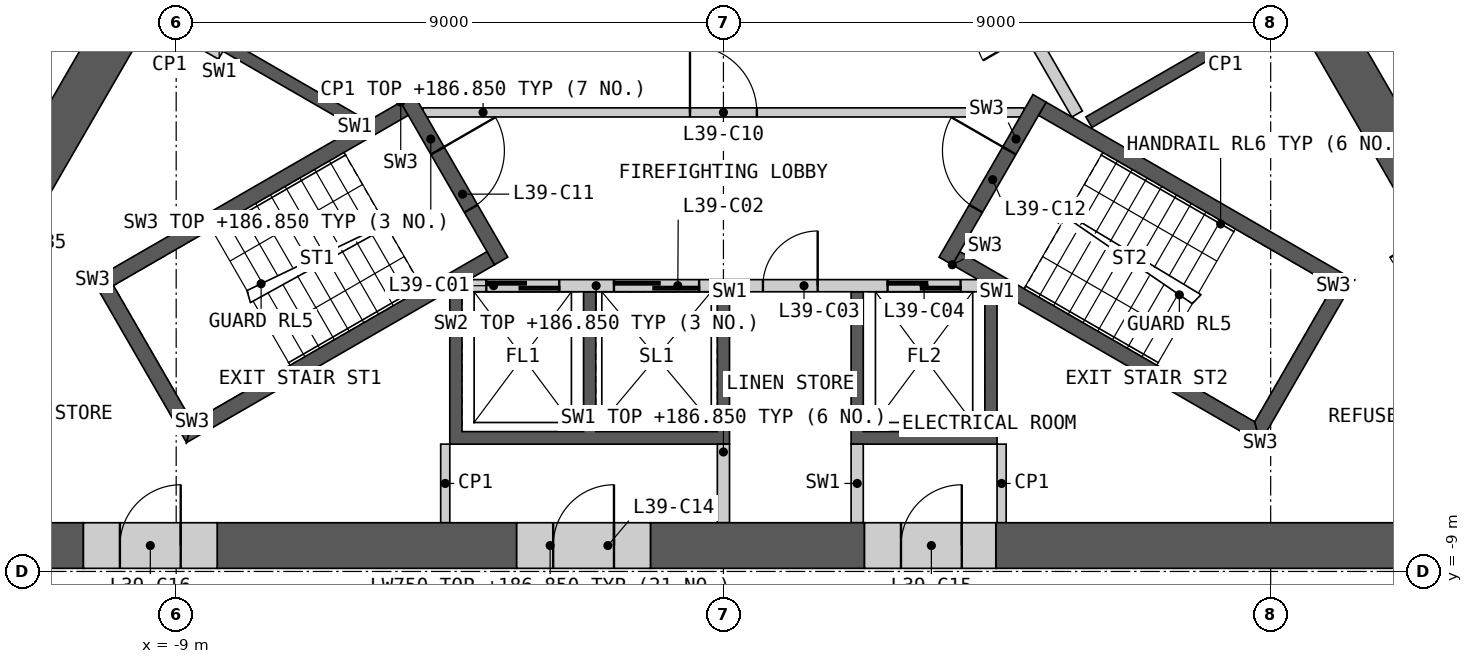
"""IFC4 building model, lengths in metres.
Left out: names, types, materials, properties, quantities, classifications, styles, units other than length and angle.
Written with IfcOpenShell. Run it as: python <this file> out.ifc"""

import sys

from ifc_helpers import new_model, si_unit, direction, frame, frame_2d, origin, place, context, subcontext, project, spatial, polyline, rectangle, outline, extrude, element, fill, save


model = new_model("IFC4")
c1 = context("Model", 3, precision=1e-05, world=origin(), true_north=direction((0.0, 1.0)))
c2 = subcontext(c1, "Body", "Model", "MODEL_VIEW")
j1 = project(units=[si_unit("LENGTHUNIT", "METRE"), si_unit("PLANEANGLEUNIT", "RADIAN")], contexts=[c1])
p1 = place(None, origin())
s1 = spatial("IfcSite", under=j1, at=p1, CompositionType="ELEMENT")
p2 = place(p1, origin())
s2 = spatial("IfcBuilding", under=s1, at=p2, CompositionType="ELEMENT")
p3 = place(p2, frame((0.0, 0.0, 183.6)))
s3 = spatial("IfcBuildingStorey", under=s2, at=p3, CompositionType="ELEMENT", Elevation=183.6)
p4 = place(p3, origin())
e1 = element("IfcWall", 1, at=p4, inside=s3, PredefinedType="SHEAR", context=c2, shape_type="SweptSolid", body=[
    extrude(outline(polyline([(4.5, -4.4), (4.5, -6.906), (2.1, -6.906), (2.1, -4.4), (2.3, -4.4), (2.3, -6.7), (4.3, -6.7), (4.3, -4.4), (4.5, -4.4)])), origin(), (0.0, 0.0, 1.0), 3.25),
])
p5 = place(p3, origin())
e2 = element("IfcWall", 2, at=p5, inside=s3, PredefinedType="SHEAR", context=c2, shape_type="SweptSolid", body=[
    extrude(outline(polyline([(0.1, -4.4), (0.1, -6.906), (-4.5, -6.906), (-4.5, -4.4), (-4.3, -4.4), (-4.3, -6.7), (-2.3, -6.7), (-2.3, -4.4), (-2.1, -4.4), (-2.1, -6.7), (-0.1, -6.7), (-0.1, -4.4), (0.1, -4.4)])), origin(), (0.0, 0.0, 1.0), 3.25),
])
p6 = place(p3, frame((-4.187, -4.3, 0.0), z_axis=(0.0, 0.0, 1.0), x_axis=(1.0, 0.0, 0.0)))
e3 = element("IfcWall", 3, at=p6, inside=s3, PredefinedType="SOLIDWALL", context=c2, shape_type="SweptSolid", body=[
    extrude(rectangle(XDim=8.373, YDim=0.2, at=frame_2d((4.187, 0.0))), origin(), (0.0, 0.0, 1.0), 3.25),
])
p7 = place(p6, frame((0.287, 0.0, 0.0)))
e4 = element("IfcOpeningElement", 4, at=p7, cuts=e3, PredefinedType="OPENING", context=c2, shape_type="SweptSolid", body=[
    extrude(rectangle(XDim=1.2, YDim=2.1, at=frame_2d((0.6, 1.05))), frame((0.0, 0.11, 0.0), z_axis=(0.0, -1.0, 0.0), x_axis=(1.0, 0.0, 0.0)), (0.0, 0.0, 1.0), 0.22),
])
p8 = place(p6, frame((2.387, 0.0, 0.0)))
e5 = element("IfcOpeningElement", 5, at=p8, cuts=e3, PredefinedType="OPENING", context=c2, shape_type="SweptSolid", body=[
    extrude(rectangle(XDim=1.4, YDim=2.1, at=frame_2d((0.7, 1.05))), frame((0.0, 0.11, 0.0), z_axis=(0.0, -1.0, 0.0), x_axis=(1.0, 0.0, 0.0)), (0.0, 0.0, 1.0), 0.22),
])
p9 = place(p6, frame((4.837, 0.0, 0.0)))
e6 = element("IfcOpeningElement", 6, at=p9, cuts=e3, PredefinedType="OPENING", context=c2, shape_type="SweptSolid", body=[
    extrude(rectangle(XDim=0.9, YDim=2.1, at=frame_2d((0.45, 1.05))), frame((0.0, 0.11, 0.0), z_axis=(0.0, -1.0, 0.0), x_axis=(1.0, 0.0, 0.0)), (0.0, 0.0, 1.0), 0.22),
])
p10 = place(p6, frame((6.887, 0.0, 0.0)))
e7 = element("IfcOpeningElement", 7, at=p10, cuts=e3, PredefinedType="OPENING", context=c2, shape_type="SweptSolid", body=[
    extrude(rectangle(XDim=1.2, YDim=2.1, at=frame_2d((0.6, 1.05))), frame((0.0, 0.11, 0.0), z_axis=(0.0, -1.0, 0.0), x_axis=(1.0, 0.0, 0.0)), (0.0, 0.0, 1.0), 0.22),
])
for number, where, z_axis, x_axis in (
    (8, (0.0, -6.906, 0.0), (0.0, 0.0, 1.0), (0.0, -1.0, 0.0)),
    (9, (2.2, -6.906, 0.0), (0.0, 0.0, 1.0), (0.0, -1.0, 0.0)),
):
    element("IfcWall", number, at=place(p3, frame(where, z_axis=z_axis, x_axis=x_axis)), inside=s3, PredefinedType="SHEAR", context=c2, shape_type="SweptSolid", body=[
        extrude(rectangle(XDim=1.293, YDim=0.2, at=frame_2d((0.646, 0.0))), origin(), (0.0, 0.0, 1.0), 3.25),
    ])
p11 = place(p3, origin())
e10 = element("IfcWall", 10, at=p11, inside=s3, PredefinedType="SHEAR", context=c2, shape_type="SweptSolid", body=[
    extrude(outline(polyline([(3.76, 2.287), (5.931, 3.54), (8.231, -0.444), (6.061, -1.697), (5.96, -1.524), (7.952, -0.374), (5.852, 3.263), (3.861, 2.113), (3.76, 2.287)])), origin(), (0.0, 0.0, 1.0), 3.25),
])
p12 = place(p3, frame((5.817, -1.476, 0.0), z_axis=(0.0, 0.0, 1.0), x_axis=(-0.500002616675, 0.866023893041, 0.0)))
e11 = element("IfcWall", 11, at=p12, inside=s3, PredefinedType="SOLIDWALL", context=c2, shape_type="SweptSolid", body=[
    extrude(rectangle(XDim=8.373, YDim=0.2, at=frame_2d((4.187, 0.0))), origin(), (0.0, 0.0, 1.0), 3.25),
])
p13 = place(p12, frame((1.537, 0.0, 0.0)))
e12 = element("IfcOpeningElement", 12, at=p13, cuts=e11, PredefinedType="OPENING", context=c2, shape_type="SweptSolid", body=[
    extrude(rectangle(XDim=0.9, YDim=2.1, at=frame_2d((0.45, 1.05))), frame((0.0, 0.11, 0.0), z_axis=(0.0, -1.0, 0.0), x_axis=(1.0, 0.0, 0.0)), (0.0, 0.0, 1.0), 0.22),
])
p14 = place(p12, frame((4.837, 0.0, 0.0)))
e13 = element("IfcOpeningElement", 13, at=p14, cuts=e11, PredefinedType="OPENING", context=c2, shape_type="SweptSolid", body=[
    extrude(rectangle(XDim=0.9, YDim=2.1, at=frame_2d((0.45, 1.05))), frame((0.0, 0.11, 0.0), z_axis=(0.0, -1.0, 0.0), x_axis=(1.0, 0.0, 0.0)), (0.0, 0.0, 1.0), 0.22),
])
p15 = place(p12, frame((6.937, 0.0, 0.0)))
e14 = element("IfcOpeningElement", 14, at=p15, cuts=e11, PredefinedType="OPENING", context=c2, shape_type="SweptSolid", body=[
    extrude(rectangle(XDim=1.1, YDim=2.1, at=frame_2d((0.55, 1.05))), frame((0.0, 0.11, 0.0), z_axis=(0.0, -1.0, 0.0), x_axis=(1.0, 0.0, 0.0)), (0.0, 0.0, 1.0), 0.22),
])
p16 = place(p3, origin())
e15 = element("IfcWall", 15, at=p16, inside=s3, PredefinedType="SHEAR", context=c2, shape_type="SweptSolid", body=[
    extrude(outline(polyline([(-6.061, -1.697), (-8.231, -0.444), (-8.131, -0.271), (-5.96, -1.524), (-6.061, -1.697)])), origin(), (0.0, 0.0, 1.0), 3.25),
])
p17 = place(p3, frame((-4.941, -1.45, 0.0), z_axis=(0.0, 0.0, 1.0), x_axis=(1.0, 0.0, 0.0)))
e16 = element("IfcWall", 16, at=p17, inside=s3, PredefinedType="PARTITIONING", context=c2, shape_type="SweptSolid", body=[
    extrude(rectangle(XDim=9.882, YDim=0.15, at=frame_2d((4.941, 0.0))), origin(), (0.0, 0.0, 1.0), 3.25),
])
p18 = place(p17, frame((4.391, 0.0, 0.0)))
e17 = element("IfcOpeningElement", 17, at=p18, cuts=e16, PredefinedType="OPENING", context=c2, shape_type="SweptSolid", body=[
    extrude(rectangle(XDim=1.1, YDim=2.1, at=frame_2d((0.55, 1.05))), frame((0.0, 0.085, 0.0), z_axis=(0.0, -1.0, 0.0), x_axis=(1.0, 0.0, 0.0)), (0.0, 0.0, 1.0), 0.17),
])
p19 = place(p3, origin())
e18 = element("IfcWall", 18, at=p19, inside=s3, PredefinedType="SHEAR", context=c2, shape_type="SweptSolid", body=[
    extrude(outline(polyline([(-5.307, -1.281), (-10.374, -4.206), (-10.032, -4.298), (-5.182, -1.498), (-5.307, -1.281)])), origin(), (0.0, 0.0, 1.0), 3.25),
])
p20 = place(p3, origin())
e19 = element("IfcWall", 19, at=p20, inside=s3, PredefinedType="SHEAR", context=c2, shape_type="SweptSolid", body=[
    extrude(outline(polyline([(-10.374, -4.206), (-8.83, -6.881), (-8.738, -6.539), (-10.032, -4.298), (-10.374, -4.206)])), origin(), (0.0, 0.0, 1.0), 3.25),
])
p21 = place(p3, origin())
e20 = element("IfcWall", 20, at=p21, inside=s3, PredefinedType="SHEAR", context=c2, shape_type="SweptSolid", body=[
    extrude(outline(polyline([(-8.738, -6.539), (-8.83, -6.881), (-3.763, -3.956), (-3.888, -3.739), (-8.738, -6.539)])), origin(), (0.0, 0.0, 1.0), 3.25),
])
p22 = place(p3, frame((-5.199, -1.219, 0.0), z_axis=(0.0, 0.0, 1.0), x_axis=(0.499982516597, -0.866035497597, 0.0)))
e21 = element("IfcWall", 21, at=p22, inside=s3, PredefinedType="SHEAR", context=c2, shape_type="SweptSolid", body=[
    extrude(rectangle(XDim=3.088, YDim=0.25, at=frame_2d((1.544, 0.0))), origin(), (0.0, 0.0, 1.0), 3.25),
])
p23 = place(p22, frame((0.994, 0.0, 0.0)))
e22 = element("IfcOpeningElement", 22, at=p23, cuts=e21, PredefinedType="OPENING", context=c2, shape_type="SweptSolid", body=[
    extrude(rectangle(XDim=1.1, YDim=2.1, at=frame_2d((0.55, 1.05))), frame((0.0, 0.135, 0.0), z_axis=(0.0, -1.0, 0.0), x_axis=(1.0, 0.0, 0.0)), (0.0, 0.0, 1.0), 0.27),
])
p24 = place(p3, origin())
e23 = element("IfcWall", 23, at=p24, inside=s3, PredefinedType="SHEAR", context=c2, shape_type="SweptSolid", body=[
    extrude(outline(polyline([(3.763, -3.956), (8.83, -6.881), (8.738, -6.539), (3.888, -3.739), (3.763, -3.956)])), origin(), (0.0, 0.0, 1.0), 3.25),
])
p25 = place(p3, origin())
e24 = element("IfcWall", 24, at=p25, inside=s3, PredefinedType="SHEAR", context=c2, shape_type="SweptSolid", body=[
    extrude(outline(polyline([(8.83, -6.881), (10.374, -4.206), (10.032, -4.298), (8.738, -6.539), (8.83, -6.881)])), origin(), (0.0, 0.0, 1.0), 3.25),
])
p26 = place(p3, origin())
e25 = element("IfcWall", 25, at=p26, inside=s3, PredefinedType="SHEAR", context=c2, shape_type="SweptSolid", body=[
    extrude(outline(polyline([(10.032, -4.298), (10.374, -4.206), (5.307, -1.281), (5.182, -1.498), (10.032, -4.298)])), origin(), (0.0, 0.0, 1.0), 3.25),
])
p27 = place(p3, frame((3.655, -3.893, 0.0), z_axis=(0.0, 0.0, 1.0), x_axis=(0.499982516597, 0.866035497597, 0.0)))
e26 = element("IfcWall", 26, at=p27, inside=s3, PredefinedType="SHEAR", context=c2, shape_type="SweptSolid", body=[
    extrude(rectangle(XDim=3.088, YDim=0.25, at=frame_2d((1.544, 0.0))), origin(), (0.0, 0.0, 1.0), 3.25),
])
p28 = place(p27, frame((0.994, 0.0, 0.0)))
e27 = element("IfcOpeningElement", 27, at=p28, cuts=e26, PredefinedType="OPENING", context=c2, shape_type="SweptSolid", body=[
    extrude(rectangle(XDim=1.1, YDim=2.1, at=frame_2d((0.55, 1.05))), frame((0.0, 0.135, 0.0), z_axis=(0.0, -1.0, 0.0), x_axis=(1.0, 0.0, 0.0)), (0.0, 0.0, 1.0), 0.27),
])
for number, where, z_axis, x_axis in (
    (28, (4.575, -6.906, 0.0), (0.0, 0.0, 1.0), (0.0, -1.0, 0.0)),
    (29, (-4.575, -6.906, 0.0), (0.0, 0.0, 1.0), (0.0, -1.0, 0.0)),
    (30, (-8.268, -0.509, 0.0), (0.0, 0.0, 1.0), (-0.866, 0.5, 0.0)),
):
    element("IfcWall", number, at=place(p3, frame(where, z_axis=z_axis, x_axis=x_axis)), inside=s3, PredefinedType="PARTITIONING", context=c2, shape_type="SweptSolid", body=[
        extrude(rectangle(XDim=1.293, YDim=0.15, at=frame_2d((0.646, 0.0))), origin(), (0.0, 0.0, 1.0), 3.25),
    ])
p29 = place(p3, frame((4.48, -8.574, 0.0), z_axis=(0.0, 0.0, 1.0), x_axis=(1.0, 0.0, 0.0)))
e31 = element("IfcWall", 31, at=p29, inside=s3, PredefinedType="SHEAR", context=c2, shape_type="SweptSolid", body=[
    extrude(rectangle(XDim=9.721, YDim=0.75, at=frame_2d((4.86, 0.0))), origin(), (0.0, 0.0, 1.0), 3.25),
])
p30 = place(p3, frame((-8.325, -8.574, 0.0), z_axis=(0.0, 0.0, 1.0), x_axis=(1.0, 0.0, 0.0)))
e32 = element("IfcWall", 32, at=p30, inside=s3, PredefinedType="SHEAR", context=c2, shape_type="SweptSolid", body=[
    extrude(rectangle(XDim=4.926, YDim=0.75, at=frame_2d((2.463, 0.0))), origin(), (0.0, 0.0, 1.0), 3.25),
])
p31 = place(p3, frame((-14.201, -8.574, 0.0), z_axis=(0.0, 0.0, 1.0), x_axis=(1.0, 0.0, 0.0)))
e33 = element("IfcWall", 33, at=p31, inside=s3, PredefinedType="SHEAR", context=c2, shape_type="SweptSolid", body=[
    extrude(rectangle(XDim=3.676, YDim=0.75, at=frame_2d((1.838, 0.0))), origin(), (0.0, 0.0, 1.0), 3.25),
])
p32 = place(p3, frame((-1.2, -8.574, 0.0), z_axis=(0.0, 0.0, 1.0), x_axis=(1.0, 0.0, 0.0)))
e34 = element("IfcWall", 34, at=p32, inside=s3, PredefinedType="SHEAR", context=c2, shape_type="SweptSolid", body=[
    extrude(rectangle(XDim=3.52, YDim=0.75, at=frame_2d((1.76, 0.0))), origin(), (0.0, 0.0, 1.0), 3.25),
])
p33 = place(p3, frame((11.527, -2.817, 0.0), z_axis=(0.0, 0.0, 1.0), x_axis=(-0.50001992892, 0.866013897511, 0.0)))
e35 = element("IfcWall", 35, at=p33, inside=s3, PredefinedType="SHEAR", context=c2, shape_type="SweptSolid", body=[
    extrude(rectangle(XDim=4.926, YDim=0.75, at=frame_2d((2.463, 0.0))), origin(), (0.0, 0.0, 1.0), 3.25),
])
p34 = place(p3, frame((-9.625, 0.477, 0.0), z_axis=(0.0, 0.0, 1.0), x_axis=(-0.499986234705, -0.866033351035, 0.0)))
e36 = element("IfcWall", 36, at=p34, inside=s3, PredefinedType="SHEAR", context=c2, shape_type="SweptSolid", body=[
    extrude(rectangle(XDim=9.801, YDim=0.75, at=frame_2d((4.9, 0.0))), origin(), (0.0, 0.0, 1.0), 3.25),
])
p35 = place(p3, frame((-3.4, -8.574, 0.0), z_axis=(0.0, 0.0, 1.0), x_axis=(1.0, 0.0, 0.0)))
e37 = element("IfcWall", 37, at=p35, inside=s3, PredefinedType="SHEAR", context=c2, shape_type="SweptSolid", body=[
    extrude(rectangle(XDim=2.2, YDim=0.75, at=frame_2d((1.1, 0.0))), origin(), (0.0, 0.0, 1.0), 3.25),
])
p36 = place(p35, frame((0.6, 0.0, 0.0)))
e38 = element("IfcOpeningElement", 38, at=p36, cuts=e37, PredefinedType="OPENING", context=c2, shape_type="SweptSolid", body=[
    extrude(rectangle(XDim=1.0, YDim=2.1, at=frame_2d((0.5, 1.05))), frame((0.0, 0.385, 0.0), z_axis=(0.0, -1.0, 0.0), x_axis=(1.0, 0.0, 0.0)), (0.0, 0.0, 1.0), 0.77),
])
p37 = place(p3, frame((2.32, -8.574, 0.0), z_axis=(0.0, 0.0, 1.0), x_axis=(1.0, 0.0, 0.0)))
e39 = element("IfcWall", 39, at=p37, inside=s3, PredefinedType="SHEAR", context=c2, shape_type="SweptSolid", body=[
    extrude(rectangle(XDim=2.16, YDim=0.75, at=frame_2d((1.08, 0.0))), origin(), (0.0, 0.0, 1.0), 3.25),
])
p38 = place(p37, frame((0.6, 0.0, 0.0)))
e40 = element("IfcOpeningElement", 40, at=p38, cuts=e39, PredefinedType="OPENING", context=c2, shape_type="SweptSolid", body=[
    extrude(rectangle(XDim=1.0, YDim=2.1, at=frame_2d((0.5, 1.05))), frame((0.0, 0.385, 0.0), z_axis=(0.0, -1.0, 0.0), x_axis=(1.0, 0.0, 0.0)), (0.0, 0.0, 1.0), 0.77),
])
p39 = place(p3, frame((-10.525, -8.574, 0.0), z_axis=(0.0, 0.0, 1.0), x_axis=(1.0, 0.0, 0.0)))
e41 = element("IfcWall", 41, at=p39, inside=s3, PredefinedType="SHEAR", context=c2, shape_type="SweptSolid", body=[
    extrude(rectangle(XDim=2.2, YDim=0.75, at=frame_2d((1.1, 0.0))), origin(), (0.0, 0.0, 1.0), 3.25),
])
p40 = place(p39, frame((0.6, 0.0, 0.0)))
e42 = element("IfcOpeningElement", 42, at=p40, cuts=e41, PredefinedType="OPENING", context=c2, shape_type="SweptSolid", body=[
    extrude(rectangle(XDim=1.0, YDim=2.1, at=frame_2d((0.5, 1.05))), frame((0.0, 0.385, 0.0), z_axis=(0.0, -1.0, 0.0), x_axis=(1.0, 0.0, 0.0)), (0.0, 0.0, 1.0), 0.77),
])
p41 = place(p3, frame((5.377, 19.385, 0.0), z_axis=(0.0, 0.0, 1.0), x_axis=(0.500000757641, -0.86602496636, 0.0)))
e43 = element("IfcWall", 43, at=p41, inside=s3, PredefinedType="PARTITIONING", context=c2, shape_type="SweptSolid", body=[
    extrude(rectangle(XDim=28.198, YDim=0.2, at=frame_2d((14.099, 0.0))), origin(), (0.0, 0.0, 1.0), 3.25),
])
p42 = place(p41, frame((22.735, 0.0, 0.0)))
e44 = element("IfcOpeningElement", 44, at=p42, cuts=e43, PredefinedType="OPENING", context=c2, shape_type="SweptSolid", body=[
    extrude(rectangle(XDim=1.8, YDim=2.1, at=frame_2d((0.9, 1.05))), frame((0.0, 0.11, 0.0), z_axis=(0.0, -1.0, 0.0), x_axis=(1.0, 0.0, 0.0)), (0.0, 0.0, 1.0), 0.22),
])
p43 = place(p41, frame((14.402, 0.0, 0.0)))
e45 = element("IfcOpeningElement", 45, at=p43, cuts=e43, PredefinedType="OPENING", context=c2, shape_type="SweptSolid", body=[
    extrude(rectangle(XDim=1.0, YDim=2.1, at=frame_2d((0.5, 1.05))), frame((0.0, 0.11, 0.0), z_axis=(0.0, -1.0, 0.0), x_axis=(1.0, 0.0, 0.0)), (0.0, 0.0, 1.0), 0.22),
])
p44 = place(p41, frame((12.796, 0.0, 0.0)))
e46 = element("IfcOpeningElement", 46, at=p44, cuts=e43, PredefinedType="OPENING", context=c2, shape_type="SweptSolid", body=[
    extrude(rectangle(XDim=1.0, YDim=2.1, at=frame_2d((0.5, 1.05))), frame((0.0, 0.11, 0.0), z_axis=(0.0, -1.0, 0.0), x_axis=(1.0, 0.0, 0.0)), (0.0, 0.0, 1.0), 0.22),
])
p45 = place(p41, frame((4.164, 0.0, 0.0)))
e47 = element("IfcOpeningElement", 47, at=p45, cuts=e43, PredefinedType="OPENING", context=c2, shape_type="SweptSolid", body=[
    extrude(rectangle(XDim=1.0, YDim=2.1, at=frame_2d((0.5, 1.05))), frame((0.0, 0.11, 0.0), z_axis=(0.0, -1.0, 0.0), x_axis=(1.0, 0.0, 0.0)), (0.0, 0.0, 1.0), 0.22),
])
p46 = place(p41, frame((1.452, 0.0, 0.0)))
e48 = element("IfcOpeningElement", 48, at=p46, cuts=e43, PredefinedType="OPENING", context=c2, shape_type="SweptSolid", body=[
    extrude(rectangle(XDim=0.95, YDim=2.1, at=frame_2d((0.475, 1.05))), frame((0.0, 0.11, 0.0), z_axis=(0.0, -1.0, 0.0), x_axis=(1.0, 0.0, 0.0)), (0.0, 0.0, 1.0), 0.22),
])
p47 = place(p3, frame((-14.619, -2.624, 0.0), z_axis=(0.0, 0.0, 1.0), x_axis=(0.50000393355, 0.866023132736, 0.0)))
e49 = element("IfcWall", 49, at=p47, inside=s3, PredefinedType="PARTITIONING", context=c2, shape_type="SweptSolid", body=[
    extrude(rectangle(XDim=9.335, YDim=0.2, at=frame_2d((4.667, 0.0))), origin(), (0.0, 0.0, 1.0), 3.25),
])
p48 = place(p47, frame((4.77, 0.0, 0.0)))
e50 = element("IfcOpeningElement", 50, at=p48, cuts=e49, PredefinedType="OPENING", context=c2, shape_type="SweptSolid", body=[
    extrude(rectangle(XDim=1.0, YDim=2.1, at=frame_2d((0.5, 1.05))), frame((0.0, 0.11, 0.0), z_axis=(0.0, -1.0, 0.0), x_axis=(1.0, 0.0, 0.0)), (0.0, 0.0, 1.0), 0.22),
])
p49 = place(p47, frame((3.163, 0.0, 0.0)))
e51 = element("IfcOpeningElement", 51, at=p49, cuts=e49, PredefinedType="OPENING", context=c2, shape_type="SweptSolid", body=[
    extrude(rectangle(XDim=1.0, YDim=2.1, at=frame_2d((0.5, 1.05))), frame((0.0, 0.11, 0.0), z_axis=(0.0, -1.0, 0.0), x_axis=(1.0, 0.0, 0.0)), (0.0, 0.0, 1.0), 0.22),
])
p50 = place(p7, origin())
e52 = element("IfcDoor", 52, at=p50, inside=s3, OperationType="SLIDING_TO_LEFT", PredefinedType="DOOR", context=c2, shape_type="SweptSolid", body=[
    extrude(rectangle(XDim=1.2, YDim=2.1, at=frame_2d((0.6, 1.05))), frame((0.0, 0.025, 0.0), z_axis=(0.0, -1.0, 0.0), x_axis=(1.0, 0.0, 0.0)), (0.0, 0.0, 1.0), 0.05),
])
fill(e4, e52)
p51 = place(p8, origin())
e53 = element("IfcDoor", 53, at=p51, inside=s3, OperationType="SLIDING_TO_LEFT", PredefinedType="DOOR", context=c2, shape_type="SweptSolid", body=[
    extrude(rectangle(XDim=1.4, YDim=2.1, at=frame_2d((0.7, 1.05))), frame((0.0, 0.025, 0.0), z_axis=(0.0, -1.0, 0.0), x_axis=(1.0, 0.0, 0.0)), (0.0, 0.0, 1.0), 0.05),
])
fill(e5, e53)
p52 = place(p9, origin())
e54 = element("IfcDoor", 54, at=p52, inside=s3, OperationType="SINGLE_SWING_RIGHT", PredefinedType="DOOR", context=c2, shape_type="SweptSolid", body=[
    extrude(rectangle(XDim=0.9, YDim=2.1, at=frame_2d((0.45, 1.05))), frame((0.0, 0.025, 0.0), z_axis=(0.0, -1.0, 0.0), x_axis=(1.0, 0.0, 0.0)), (0.0, 0.0, 1.0), 0.05),
])
fill(e6, e54)
p53 = place(p10, origin())
e55 = element("IfcDoor", 55, at=p53, inside=s3, OperationType="SLIDING_TO_LEFT", PredefinedType="DOOR", context=c2, shape_type="SweptSolid", body=[
    extrude(rectangle(XDim=1.2, YDim=2.1, at=frame_2d((0.6, 1.05))), frame((0.0, 0.025, 0.0), z_axis=(0.0, -1.0, 0.0), x_axis=(1.0, 0.0, 0.0)), (0.0, 0.0, 1.0), 0.05),
])
fill(e7, e55)
p54 = place(p18, origin())
e56 = element("IfcDoor", 56, at=p54, inside=s3, OperationType="SINGLE_SWING_LEFT", PredefinedType="DOOR", context=c2, shape_type="SweptSolid", body=[
    extrude(rectangle(XDim=1.1, YDim=2.1, at=frame_2d((0.55, 1.05))), frame((0.0, 0.025, 0.0), z_axis=(0.0, -1.0, 0.0), x_axis=(1.0, 0.0, 0.0)), (0.0, 0.0, 1.0), 0.05),
])
fill(e17, e56)
p55 = place(p23, origin())
e57 = element("IfcDoor", 57, at=p55, inside=s3, OperationType="SINGLE_SWING_LEFT", PredefinedType="DOOR", context=c2, shape_type="SweptSolid", body=[
    extrude(rectangle(XDim=1.1, YDim=2.1, at=frame_2d((0.55, 1.05))), frame((0.0, 0.025, 0.0), z_axis=(0.0, -1.0, 0.0), x_axis=(1.0, 0.0, 0.0)), (0.0, 0.0, 1.0), 0.05),
])
fill(e22, e57)
p56 = place(p28, origin())
e58 = element("IfcDoor", 58, at=p56, inside=s3, OperationType="SINGLE_SWING_RIGHT", PredefinedType="DOOR", context=c2, shape_type="SweptSolid", body=[
    extrude(rectangle(XDim=1.1, YDim=2.1, at=frame_2d((0.55, 1.05))), frame((0.0, 0.025, 0.0), z_axis=(0.0, -1.0, 0.0), x_axis=(1.0, 0.0, 0.0)), (0.0, 0.0, 1.0), 0.05),
])
fill(e27, e58)
p57 = place(p36, origin())
e59 = element("IfcDoor", 59, at=p57, inside=s3, OperationType="SINGLE_SWING_RIGHT", PredefinedType="DOOR", context=c2, shape_type="SweptSolid", body=[
    extrude(rectangle(XDim=1.0, YDim=2.1, at=frame_2d((0.5, 1.05))), frame((0.0, 0.13, 0.0), z_axis=(0.0, -1.0, 0.0), x_axis=(1.0, 0.0, 0.0)), (0.0, 0.0, 1.0), 0.05),
])
fill(e38, e59)
p58 = place(p38, origin())
e60 = element("IfcDoor", 60, at=p58, inside=s3, OperationType="SINGLE_SWING_RIGHT", PredefinedType="DOOR", context=c2, shape_type="SweptSolid", body=[
    extrude(rectangle(XDim=1.0, YDim=2.1, at=frame_2d((0.5, 1.05))), frame((0.0, 0.13, 0.0), z_axis=(0.0, -1.0, 0.0), x_axis=(1.0, 0.0, 0.0)), (0.0, 0.0, 1.0), 0.05),
])
fill(e40, e60)
p59 = place(p40, origin())
e61 = element("IfcDoor", 61, at=p59, inside=s3, OperationType="SINGLE_SWING_RIGHT", PredefinedType="DOOR", context=c2, shape_type="SweptSolid", body=[
    extrude(rectangle(XDim=1.0, YDim=2.1, at=frame_2d((0.5, 1.05))), frame((0.0, 0.13, 0.0), z_axis=(0.0, -1.0, 0.0), x_axis=(1.0, 0.0, 0.0)), (0.0, 0.0, 1.0), 0.05),
])
fill(e42, e61)
save(model, sys.argv[1])
